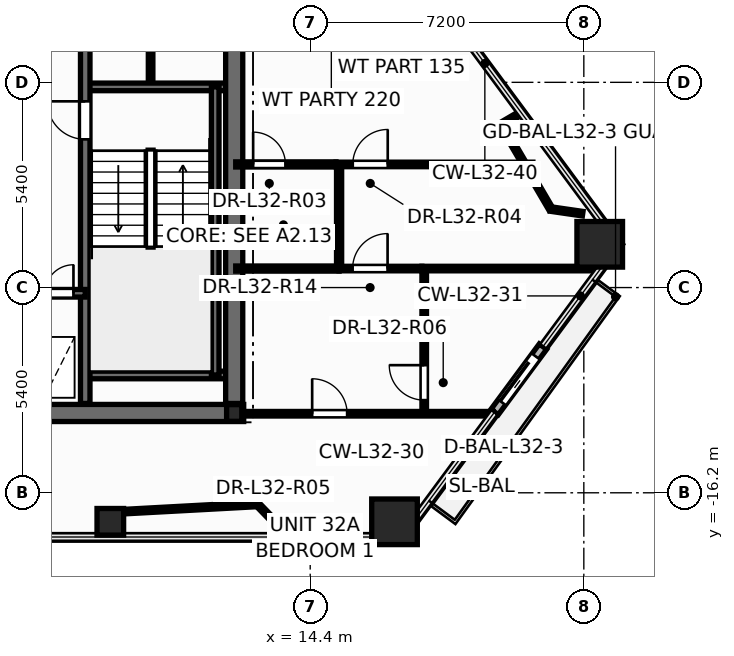
"""IFC4 building model, lengths in metres.
Left out: names, types, materials, properties, quantities, classifications, styles, units other than length and angle.
Written with IfcOpenShell. Run it as: python <this file> out.ifc"""

import sys

from ifc_helpers import new_model, si_unit, direction, frame, frame_2d, origin, origin_2d, place, context, subcontext, project, spatial, rectangle, hollow_rectangle, hollow_circle, i_section, extrude, element, fill, save


model = new_model("IFC4")
c1 = context("Model", 3, precision=1e-05, world=origin(), true_north=direction((0.0, 1.0)))
c2 = subcontext(c1, "Body", "Model", "MODEL_VIEW")
j1 = project(units=[si_unit("LENGTHUNIT", "METRE"), si_unit("PLANEANGLEUNIT", "RADIAN")], contexts=[c1])
p1 = place(None, origin())
s1 = spatial("IfcSite", under=j1, at=p1, CompositionType="ELEMENT")
p2 = place(p1, origin())
s2 = spatial("IfcBuilding", under=s1, at=p2, CompositionType="ELEMENT")
p3 = place(p2, frame((0.0, 0.0, 125.7)))
s3 = spatial("IfcBuildingStorey", under=s2, at=p3, CompositionType="ELEMENT", Elevation=125.7)
for number, where, z_axis, x_axis in (
    (1, (16.618, -16.963, 0.0), (0.0, 0.0, 1.0), (1.0, 0.0, 0.0)),
    (2, (22.019, -9.662, 0.0), (0.0, 0.0, 1.0), (1.0, 0.0, 0.0)),
):
    element("IfcColumn", number, at=place(p3, frame(where, z_axis=z_axis, x_axis=x_axis)), inside=s3, PredefinedType="COLUMN", context=c2, shape_type="SweptSolid", body=[
        extrude(hollow_rectangle(XDim=1.2, YDim=1.2, WallThickness=0.055, at=origin_2d()), origin(), (0.0, 0.0, 1.0), 3.6),
    ])
p4 = place(p3, frame((9.14, -16.963, 0.0), z_axis=(0.0, 0.0, 1.0), x_axis=(1.0, 0.0, 0.0)))
e3 = element("IfcColumn", 3, at=p4, inside=s3, PredefinedType="COLUMN", context=c2, shape_type="SweptSolid", body=[
    extrude(hollow_circle(Radius=0.35, WallThickness=0.03, at=origin_2d()), origin(), (0.0, 0.0, 1.0), 3.6),
])
p5 = place(p3, frame((12.4, -14.1, 0.0), z_axis=(0.0, 0.0, 1.0), x_axis=(1.0, 0.0, 0.0)))
e4 = element("IfcColumn", 4, at=p5, inside=s3, PredefinedType="COLUMN", context=c2, shape_type="SweptSolid", body=[
    extrude(i_section(OverallWidth=0.4, OverallDepth=0.44, WebThickness=0.028, FlangeThickness=0.04, at=origin_2d()), origin(), (0.0, 0.0, 1.0), 3.6),
])
p6 = place(p3, frame((19.252, -14.075, -0.015), z_axis=(0.0, 0.0, 1.0), x_axis=(0.594711783508, 0.803938986837, 0.0)))
e5 = element("IfcWall", 5, at=p6, inside=s3, PredefinedType="STANDARD", context=c2, shape_type="SweptSolid", body=[
    extrude(rectangle(XDim=2.14, YDim=0.24, at=frame_2d((1.07, 0.0))), origin(), (0.0, 0.0, 1.0), 2.807),
])
p7 = place(p6, frame((0.32, 0.0, 0.015)))
e6 = element("IfcOpeningElement", 6, at=p7, cuts=e5, PredefinedType="OPENING", context=c2, shape_type="SweptSolid", body=[
    extrude(rectangle(XDim=1.506, YDim=2.204, at=frame_2d((0.75, 1.102))), frame((0.0, 0.13, 0.0), z_axis=(0.0, -1.0, 0.0), x_axis=(1.0, 0.0, 0.0)), (0.0, 0.0, 1.0), 0.26),
])
p8 = place(p3, frame((10.2, -5.52, 0.0), z_axis=(0.0, 0.0, 1.0), x_axis=(0.0, 1.0, 0.0)))
e7 = element("IfcWall", 7, at=p8, inside=s3, PredefinedType="PARTITIONING", context=c2, shape_type="SweptSolid", body=[
    extrude(rectangle(XDim=1.12, YDim=0.12, at=frame_2d((0.56, 0.0))), origin(), (0.0, 0.0, 1.0), 3.35),
])
p9 = place(p3, frame((-12.65, -14.1, 0.0), z_axis=(0.0, 0.0, 1.0), x_axis=(1.0, 0.0, 0.0)))
e8 = element("IfcWall", 8, at=p9, inside=s3, PredefinedType="SHEAR", context=c2, shape_type="SweptSolid", body=[
    extrude(rectangle(XDim=25.3, YDim=0.45, at=frame_2d((12.65, 0.0))), origin(), (0.0, 0.0, 1.0), 3.6),
])
for number, where, z_axis, x_axis in (
    (9, (8.48, -5.52, 0.0), (0.0, 0.0, 1.0), (1.0, 0.0, 0.0)),
    (10, (8.48, -13.1, 0.0), (0.0, 0.0, 1.0), (1.0, 0.0, 0.0)),
):
    element("IfcWall", number, at=place(p3, frame(where, z_axis=z_axis, x_axis=x_axis)), inside=s3, PredefinedType="SOLIDWALL", context=c2, shape_type="SweptSolid", body=[
        extrude(rectangle(XDim=3.87, YDim=0.2, at=frame_2d((1.935, 0.0))), origin(), (0.0, 0.0, 1.0), 3.6),
    ])
p10 = place(p3, frame((11.9, -13.1, 0.0), z_axis=(0.0, 0.0, 1.0), x_axis=(0.0, 1.0, 0.0)))
e11 = element("IfcWall", 11, at=p10, inside=s3, PredefinedType="SOLIDWALL", context=c2, shape_type="SweptSolid", body=[
    extrude(rectangle(XDim=7.58, YDim=0.2, at=frame_2d((3.79, 0.0))), origin(), (0.0, 0.0, 1.0), 3.6),
])
p11 = place(p3, frame((8.48, -13.85, 0.0), z_axis=(0.0, 0.0, 1.0), x_axis=(0.0, 1.0, 0.0)))
e12 = element("IfcWall", 12, at=p11, inside=s3, PredefinedType="SHEAR", context=c2, shape_type="SweptSolid", body=[
    extrude(rectangle(XDim=9.4, YDim=0.25, at=frame_2d((4.7, 0.0))), origin(), (0.0, 0.0, 1.0), 3.6),
])
p12 = place(p11, frame((6.95, 0.0, 0.0)))
e13 = element("IfcOpeningElement", 13, at=p12, cuts=e12, PredefinedType="OPENING", context=c2, shape_type="SweptSolid", body=[
    extrude(rectangle(XDim=1.006, YDim=2.104, at=frame_2d((0.5, 1.052))), frame((0.0, 0.135, 0.0), z_axis=(0.0, -1.0, 0.0), x_axis=(1.0, 0.0, 0.0)), (0.0, 0.0, 1.0), 0.27),
])
p13 = place(p3, frame((5.12, -10.95, 0.0), z_axis=(0.0, 0.0, 1.0), x_axis=(1.0, 0.0, 0.0)))
e14 = element("IfcWall", 14, at=p13, inside=s3, PredefinedType="SOLIDWALL", context=c2, shape_type="SweptSolid", body=[
    extrude(rectangle(XDim=3.36, YDim=0.2, at=frame_2d((1.68, 0.0))), origin(), (0.0, 0.0, 1.0), 3.6),
])
p14 = place(p13, frame((0.42, 0.0, 0.0)))
e15 = element("IfcOpeningElement", 15, at=p14, cuts=e14, PredefinedType="OPENING", context=c2, shape_type="SweptSolid", body=[
    extrude(rectangle(XDim=1.106, YDim=2.104, at=frame_2d((0.55, 1.052))), frame((0.0, 0.11, 0.0), z_axis=(0.0, -1.0, 0.0), x_axis=(1.0, 0.0, 0.0)), (0.0, 0.0, 1.0), 0.22),
])
p15 = place(p13, frame((2.3, 0.0, 0.0)))
e16 = element("IfcOpeningElement", 16, at=p15, cuts=e14, PredefinedType="OPENING", context=c2, shape_type="SweptSolid", body=[
    extrude(rectangle(XDim=0.756, YDim=2.054, at=frame_2d((0.375, 1.027))), frame((0.0, 0.11, 0.0), z_axis=(0.0, -1.0, 0.0), x_axis=(1.0, 0.0, 0.0)), (0.0, 0.0, 1.0), 0.22),
])
p16 = place(p3, frame((12.4, -13.85, 0.0), z_axis=(0.0, 0.0, 1.0), x_axis=(0.0, 1.0, 0.0)))
e17 = element("IfcWall", 17, at=p16, inside=s3, PredefinedType="SHEAR", context=c2, shape_type="SweptSolid", body=[
    extrude(rectangle(XDim=9.4, YDim=0.45, at=frame_2d((4.7, 0.0))), origin(), (0.0, 0.0, 1.0), 3.6),
])
p17 = place(p3, frame((12.64, -14.12, 0.0), z_axis=(0.0, 0.0, 1.0), x_axis=(1.0, 0.0, 0.0)))
e18 = element("IfcWall", 18, at=p17, inside=s3, PredefinedType="PARTITIONING", context=c2, shape_type="SweptSolid", body=[
    extrude(rectangle(XDim=6.579, YDim=0.12, at=frame_2d((3.29, 0.0))), origin(), (0.0, 0.0, 1.0), 2.325),
])
p18 = place(p17, frame((1.811, 0.0, 0.0)))
e19 = element("IfcOpeningElement", 19, at=p18, cuts=e18, PredefinedType="OPENING", context=c2, shape_type="SweptSolid", body=[
    extrude(rectangle(XDim=0.926, YDim=2.104, at=frame_2d((0.46, 1.052))), frame((0.0, 0.07, 0.0), z_axis=(0.0, -1.0, 0.0), x_axis=(1.0, 0.0, 0.0)), (0.0, 0.0, 1.0), 0.14),
])
p19 = place(p3, frame((15.08, -7.56, 0.0), z_axis=(0.0, 0.0, 1.0), x_axis=(1.0, 0.0, 0.0)))
e20 = element("IfcWall", 20, at=p19, inside=s3, PredefinedType="PARTITIONING", context=c2, shape_type="SweptSolid", body=[
    extrude(rectangle(XDim=5.18, YDim=0.12, at=frame_2d((2.59, 0.0))), origin(), (0.0, 0.0, 1.0), 2.325),
])
p20 = place(p19, frame((0.44, 0.0, 0.0)))
e21 = element("IfcOpeningElement", 21, at=p20, cuts=e20, PredefinedType="OPENING", context=c2, shape_type="SweptSolid", body=[
    extrude(rectangle(XDim=0.926, YDim=2.104, at=frame_2d((0.46, 1.052))), frame((0.0, 0.07, 0.0), z_axis=(0.0, -1.0, 0.0), x_axis=(1.0, 0.0, 0.0)), (0.0, 0.0, 1.0), 0.14),
])
p21 = place(p3, frame((17.34, -10.3, 0.0), z_axis=(0.0, 0.0, 1.0), x_axis=(1.0, 0.0, 0.0)))
e22 = element("IfcWall", 22, at=p21, inside=s3, PredefinedType="PARTITIONING", context=c2, shape_type="SweptSolid", body=[
    extrude(rectangle(XDim=4.704, YDim=0.12, at=frame_2d((2.352, 0.0))), origin(), (0.0, 0.0, 1.0), 2.792),
])
p22 = place(p3, frame((17.4, -14.12, 0.0), z_axis=(0.0, 0.0, 1.0), x_axis=(0.0, 1.0, 0.0)))
e23 = element("IfcWall", 23, at=p22, inside=s3, PredefinedType="PARTITIONING", context=c2, shape_type="SweptSolid", body=[
    extrude(rectangle(XDim=3.82, YDim=0.12, at=frame_2d((1.91, 0.0))), origin(), (0.0, 0.0, 1.0), 3.35),
])
p23 = place(p22, frame((0.358, 0.0, 0.0)))
e24 = element("IfcOpeningElement", 24, at=p23, cuts=e23, PredefinedType="OPENING", context=c2, shape_type="SweptSolid", body=[
    extrude(rectangle(XDim=0.926, YDim=2.104, at=frame_2d((0.46, 1.052))), frame((0.0, 0.07, 0.0), z_axis=(0.0, -1.0, 0.0), x_axis=(1.0, 0.0, 0.0)), (0.0, 0.0, 1.0), 0.14),
])
p24 = place(p3, frame((9.07, -16.719, 0.0), z_axis=(0.0, 0.0, 1.0), x_axis=(0.998537679812, 0.054060170142, 0.0)))
e25 = element("IfcWall", 25, at=p24, inside=s3, PredefinedType="PARTITIONING", context=c2, shape_type="SweptSolid", body=[
    extrude(rectangle(XDim=3.952, YDim=0.12, at=frame_2d((1.976, 0.0))), origin(), (0.0, 0.0, 1.0), 2.325),
])
p25 = place(p3, frame((12.44, -7.56, 0.0), z_axis=(0.0, 0.0, 1.0), x_axis=(1.0, 0.0, 0.0)))
e26 = element("IfcWall", 26, at=p25, inside=s3, PredefinedType="PARTITIONING", context=c2, shape_type="SweptSolid", body=[
    extrude(rectangle(XDim=2.638, YDim=0.135, at=frame_2d((1.319, 0.0))), origin(), (0.0, 0.0, 1.0), 2.792),
])
p26 = place(p25, frame((0.458, 0.0, 0.0)))
e27 = element("IfcOpeningElement", 27, at=p26, cuts=e26, PredefinedType="OPENING", context=c2, shape_type="SweptSolid", body=[
    extrude(rectangle(XDim=0.856, YDim=2.104, at=frame_2d((0.425, 1.052))), frame((0.0, 0.078, 0.0), z_axis=(0.0, -1.0, 0.0), x_axis=(1.0, 0.0, 0.0)), (0.0, 0.0, 1.0), 0.155),
])
p27 = place(p3, frame((15.16, -10.3, 0.0), z_axis=(0.0, 0.0, 1.0), x_axis=(0.0, 1.0, 0.0)))
e28 = element("IfcWall", 28, at=p27, inside=s3, PredefinedType="PARTITIONING", context=c2, shape_type="SweptSolid", body=[
    extrude(rectangle(XDim=2.74, YDim=0.135, at=frame_2d((1.37, 0.0))), origin(), (0.0, 0.0, 1.0), 3.35),
])
p28 = place(p3, frame((12.44, -10.3, 0.0), z_axis=(0.0, 0.0, 1.0), x_axis=(1.0, 0.0, 0.0)))
e29 = element("IfcWall", 29, at=p28, inside=s3, PredefinedType="PARTITIONING", context=c2, shape_type="SweptSolid", body=[
    extrude(rectangle(XDim=2.72, YDim=0.135, at=frame_2d((1.36, 0.0))), origin(), (0.0, 0.0, 1.0), 2.792),
])
p29 = place(p3, frame((20.733, -8.735, 0.0), z_axis=(0.0, 0.0, 1.0), x_axis=(-0.505993956434, 0.862537023004, 0.0)))
e30 = element("IfcWall", 30, at=p29, inside=s3, PredefinedType="PARTITIONING", context=c2, shape_type="SweptSolid", body=[
    extrude(rectangle(XDim=2.579, YDim=0.12, at=frame_2d((1.29, 0.0))), origin(), (0.0, 0.0, 1.0), 2.325),
])
p30 = place(p3, frame((15.16, -10.3, 0.0), z_axis=(0.0, 0.0, 1.0), x_axis=(1.0, 0.0, 0.0)))
e31 = element("IfcWall", 31, at=p30, inside=s3, PredefinedType="PARTITIONING", context=c2, shape_type="SweptSolid", body=[
    extrude(rectangle(XDim=2.178, YDim=0.12, at=frame_2d((1.089, 0.0))), origin(), (0.0, 0.0, 1.0), 3.35),
])
p31 = place(p30, frame((0.356, 0.0, 0.0)))
e32 = element("IfcOpeningElement", 32, at=p31, cuts=e31, PredefinedType="OPENING", context=c2, shape_type="SweptSolid", body=[
    extrude(rectangle(XDim=0.926, YDim=2.104, at=frame_2d((0.46, 1.052))), frame((0.0, 0.07, 0.0), z_axis=(0.0, -1.0, 0.0), x_axis=(1.0, 0.0, 0.0)), (0.0, 0.0, 1.0), 0.14),
])
p32 = place(p3, frame((13.016, -16.505, 0.0), z_axis=(0.0, 0.0, 1.0), x_axis=(0.69475899008, -0.719242619498, 0.0)))
e33 = element("IfcWall", 33, at=p32, inside=s3, PredefinedType="PARTITIONING", context=c2, shape_type="SweptSolid", body=[
    extrude(rectangle(XDim=0.848, YDim=0.12, at=frame_2d((0.424, 0.0))), origin(), (0.0, 0.0, 1.0), 2.792),
])
p33 = place(p3, frame((21.571, -8.856, 0.0), z_axis=(0.0, 0.0, 1.0), x_axis=(-0.989670684279, 0.143359466653, 0.0)))
e34 = element("IfcWall", 34, at=p33, inside=s3, PredefinedType="PARTITIONING", context=c2, shape_type="SweptSolid", body=[
    extrude(rectangle(XDim=0.846, YDim=0.12, at=frame_2d((0.423, 0.0))), origin(), (0.0, 0.0, 1.0), 2.325),
])
p34 = place(p3, frame((9.104, -17.353, 0.0), z_axis=(0.0, 0.0, 1.0), x_axis=(-0.053788890406, 0.99855232976, 0.0)))
e35 = element("IfcWall", 35, at=p34, inside=s3, PredefinedType="PARTITIONING", context=c2, shape_type="SweptSolid", body=[
    extrude(rectangle(XDim=0.635, YDim=0.12, at=frame_2d((0.318, 0.0))), origin(), (0.0, 0.0, 1.0), 2.325),
])
p35 = place(p3, frame((19.428, -6.51, 0.0), z_axis=(0.0, 0.0, 1.0), x_axis=(0.86267356237, 0.505761134121, 0.0)))
e36 = element("IfcWall", 36, at=p35, inside=s3, PredefinedType="PARTITIONING", context=c2, shape_type="SweptSolid", body=[
    extrude(rectangle(XDim=0.602, YDim=0.12, at=frame_2d((0.301, 0.0))), origin(), (0.0, 0.0, 1.0), 2.792),
])
p36 = place(p7, origin())
e37 = element("IfcDoor", 37, at=p36, inside=s3, OperationType="SLIDING_TO_RIGHT", PredefinedType="DOOR", context=c2, shape_type="SweptSolid", body=[
    extrude(rectangle(XDim=1.5, YDim=2.2, at=frame_2d((0.75, 1.1))), frame((0.0, 0.025, 0.0), z_axis=(0.0, -1.0, 0.0), x_axis=(1.0, 0.0, 0.0)), (0.0, 0.0, 1.0), 0.05),
])
fill(e6, e37)
p37 = place(p12, origin())
e38 = element("IfcDoor", 38, at=p37, inside=s3, OperationType="SINGLE_SWING_RIGHT", PredefinedType="DOOR", context=c2, shape_type="SweptSolid", body=[
    extrude(rectangle(XDim=1.0, YDim=2.1, at=frame_2d((0.5, 1.05))), frame((0.0, 0.025, 0.0), z_axis=(0.0, -1.0, 0.0), x_axis=(1.0, 0.0, 0.0)), (0.0, 0.0, 1.0), 0.05),
])
fill(e13, e38)
p38 = place(p15, origin())
e39 = element("IfcDoor", 39, at=p38, inside=s3, OperationType="SINGLE_SWING_RIGHT", PredefinedType="DOOR", context=c2, shape_type="SweptSolid", body=[
    extrude(rectangle(XDim=0.75, YDim=2.05, at=frame_2d((0.375, 1.025))), frame((0.0, 0.025, 0.0), z_axis=(0.0, -1.0, 0.0), x_axis=(1.0, 0.0, 0.0)), (0.0, 0.0, 1.0), 0.05),
])
fill(e16, e39)
p39 = place(p26, origin())
e40 = element("IfcDoor", 40, at=p39, inside=s3, OperationType="SINGLE_SWING_LEFT", PredefinedType="DOOR", context=c2, shape_type="SweptSolid", body=[
    extrude(rectangle(XDim=0.85, YDim=2.1, at=frame_2d((0.425, 1.05))), frame((0.0, 0.025, 0.0), z_axis=(0.0, -1.0, 0.0), x_axis=(1.0, 0.0, 0.0)), (0.0, 0.0, 1.0), 0.05),
])
fill(e27, e40)
p40 = place(p20, origin())
e41 = element("IfcDoor", 41, at=p40, inside=s3, OperationType="SINGLE_SWING_RIGHT", PredefinedType="DOOR", context=c2, shape_type="SweptSolid", body=[
    extrude(rectangle(XDim=0.92, YDim=2.1, at=frame_2d((0.46, 1.05))), frame((0.0, 0.025, 0.0), z_axis=(0.0, -1.0, 0.0), x_axis=(1.0, 0.0, 0.0)), (0.0, 0.0, 1.0), 0.05),
])
fill(e21, e41)
p41 = place(p18, origin())
e42 = element("IfcDoor", 42, at=p41, inside=s3, OperationType="SINGLE_SWING_LEFT", PredefinedType="DOOR", context=c2, shape_type="SweptSolid", body=[
    extrude(rectangle(XDim=0.92, YDim=2.1, at=frame_2d((0.46, 1.05))), frame((0.0, 0.025, 0.0), z_axis=(0.0, -1.0, 0.0), x_axis=(1.0, 0.0, 0.0)), (0.0, 0.0, 1.0), 0.05),
])
fill(e19, e42)
p42 = place(p23, origin())
e43 = element("IfcDoor", 43, at=p42, inside=s3, OperationType="SINGLE_SWING_RIGHT", PredefinedType="DOOR", context=c2, shape_type="SweptSolid", body=[
    extrude(rectangle(XDim=0.92, YDim=2.1, at=frame_2d((0.46, 1.05))), frame((0.0, 0.025, 0.0), z_axis=(0.0, -1.0, 0.0), x_axis=(1.0, 0.0, 0.0)), (0.0, 0.0, 1.0), 0.05),
])
fill(e24, e43)
p43 = place(p31, origin())
e44 = element("IfcDoor", 44, at=p43, inside=s3, OperationType="SINGLE_SWING_RIGHT", PredefinedType="DOOR", context=c2, shape_type="SweptSolid", body=[
    extrude(rectangle(XDim=0.92, YDim=2.1, at=frame_2d((0.46, 1.05))), frame((0.0, 0.025, 0.0), z_axis=(0.0, -1.0, 0.0), x_axis=(1.0, 0.0, 0.0)), (0.0, 0.0, 1.0), 0.05),
])
fill(e32, e44)
save(model, sys.argv[1])
